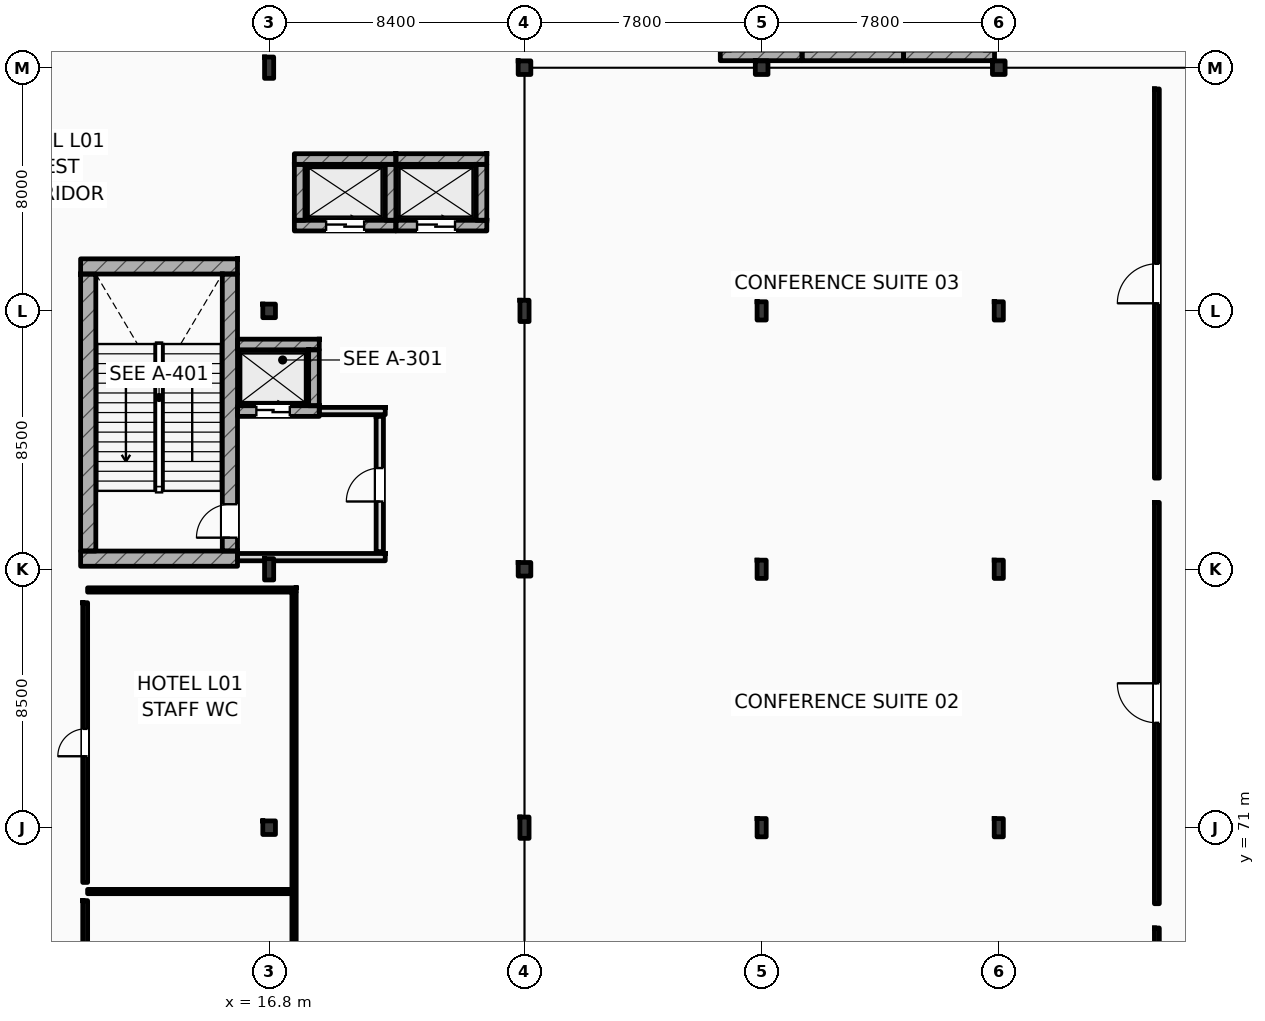
"""IFC4 building model, lengths in metres.
Left out: names, types, materials, properties, quantities, classifications, styles, units other than length and angle.
Written with IfcOpenShell. Run it as: python <this file> out.ifc"""

import sys

from ifc_helpers import new_model, si_unit, direction, frame, frame_2d, origin, origin_2d, place, context, subcontext, project, spatial, rectangle, i_section, extrude, element, fill, save


model = new_model("IFC4")
c1 = context("Model", 3, precision=1e-05, world=origin(), true_north=direction((0.0, 1.0)))
c2 = subcontext(c1, "Body", "Model", "MODEL_VIEW")
j1 = project(units=[si_unit("LENGTHUNIT", "METRE"), si_unit("PLANEANGLEUNIT", "RADIAN")], contexts=[c1])
p1 = place(None, origin())
s1 = spatial("IfcSite", under=j1, at=p1, CompositionType="ELEMENT")
p2 = place(p1, origin())
s2 = spatial("IfcBuilding", under=s1, at=p2, CompositionType="ELEMENT")
p3 = place(p2, frame((0.0, 0.0, 6.0)))
s3 = spatial("IfcBuildingStorey", under=s2, at=p3, CompositionType="ELEMENT", Elevation=6.0)
p4 = place(p3, frame((16.8, 71.0, 0.0), z_axis=(0.0, 0.0, 1.0), x_axis=(1.0, 0.0, 0.0)))
e1 = element("IfcColumn", 1, at=p4, inside=s3, PredefinedType="COLUMN", context=c2, shape_type="SweptSolid", body=[
    extrude(i_section(OverallWidth=0.416, OverallDepth=0.446, WebThickness=0.036, FlangeThickness=0.048, FilletRadius=0.015, at=origin_2d()), origin(), (0.0, 0.0, 1.0), 5.4),
])
p5 = place(p3, frame((16.8, 79.5, 0.0), z_axis=(0.0, 0.0, 1.0), x_axis=(1.0, 0.0, 0.0)))
e2 = element("IfcColumn", 2, at=p5, inside=s3, PredefinedType="COLUMN", context=c2, shape_type="SweptSolid", body=[
    extrude(i_section(OverallWidth=0.3, OverallDepth=0.7, WebThickness=0.017, FlangeThickness=0.032, FilletRadius=0.027, at=origin_2d()), origin(), (0.0, 0.0, 1.0), 5.4),
])
p6 = place(p3, frame((16.8, 88.0, 0.0), z_axis=(0.0, 0.0, 1.0), x_axis=(1.0, 0.0, 0.0)))
e3 = element("IfcColumn", 3, at=p6, inside=s3, PredefinedType="COLUMN", context=c2, shape_type="SweptSolid", body=[
    extrude(i_section(OverallWidth=0.416, OverallDepth=0.446, WebThickness=0.036, FlangeThickness=0.048, FilletRadius=0.015, at=origin_2d()), origin(), (0.0, 0.0, 1.0), 5.4),
])
for number, where, z_axis, x_axis in (
    (4, (16.8, 96.0, 0.0), (0.0, 0.0, 1.0), (1.0, 0.0, 0.0)),
    (5, (25.2, 71.0, 0.0), (0.0, 0.0, 1.0), (1.0, 0.0, 0.0)),
):
    element("IfcColumn", number, at=place(p3, frame(where, z_axis=z_axis, x_axis=x_axis)), inside=s3, PredefinedType="COLUMN", context=c2, shape_type="SweptSolid", body=[
        extrude(i_section(OverallWidth=0.3, OverallDepth=0.7, WebThickness=0.017, FlangeThickness=0.032, FilletRadius=0.027, at=origin_2d()), origin(), (0.0, 0.0, 1.0), 5.4),
    ])
p7 = place(p3, frame((25.2, 79.5, 0.0), z_axis=(0.0, 0.0, 1.0), x_axis=(1.0, 0.0, 0.0)))
e6 = element("IfcColumn", 6, at=p7, inside=s3, PredefinedType="COLUMN", context=c2, shape_type="SweptSolid", body=[
    extrude(i_section(OverallWidth=0.416, OverallDepth=0.446, WebThickness=0.036, FlangeThickness=0.048, FilletRadius=0.015, at=origin_2d()), origin(), (0.0, 0.0, 1.0), 5.4),
])
p8 = place(p3, frame((25.2, 88.0, 0.0), z_axis=(0.0, 0.0, 1.0), x_axis=(1.0, 0.0, 0.0)))
e7 = element("IfcColumn", 7, at=p8, inside=s3, PredefinedType="COLUMN", context=c2, shape_type="SweptSolid", body=[
    extrude(i_section(OverallWidth=0.3, OverallDepth=0.7, WebThickness=0.017, FlangeThickness=0.032, FilletRadius=0.027, at=origin_2d()), origin(), (0.0, 0.0, 1.0), 5.4),
])
for number, where, z_axis, x_axis in (
    (8, (25.2, 96.0, 0.0), (0.0, 0.0, 1.0), (1.0, 0.0, 0.0)),
    (9, (33.0, 96.0, 0.0), (0.0, 0.0, 1.0), (1.0, 0.0, 0.0)),
    (10, (40.8, 96.0, 0.0), (0.0, 0.0, 1.0), (1.0, 0.0, 0.0)),
):
    element("IfcColumn", number, at=place(p3, frame(where, z_axis=z_axis, x_axis=x_axis)), inside=s3, PredefinedType="COLUMN", context=c2, shape_type="SweptSolid", body=[
        extrude(i_section(OverallWidth=0.416, OverallDepth=0.446, WebThickness=0.036, FlangeThickness=0.048, FilletRadius=0.015, at=origin_2d()), origin(), (0.0, 0.0, 1.0), 5.4),
    ])
for number, where, z_axis, x_axis in (
    (11, (33.0, 71.0, 0.0), (0.0, 0.0, 1.0), (1.0, 0.0, 0.0)),
    (12, (33.0, 79.5, 0.0), (0.0, 0.0, 1.0), (1.0, 0.0, 0.0)),
    (13, (33.0, 88.0, 0.0), (0.0, 0.0, 1.0), (1.0, 0.0, 0.0)),
    (14, (40.8, 71.0, 0.0), (0.0, 0.0, 1.0), (1.0, 0.0, 0.0)),
    (15, (40.8, 79.5, 0.0), (0.0, 0.0, 1.0), (1.0, 0.0, 0.0)),
    (16, (40.8, 88.0, 0.0), (0.0, 0.0, 1.0), (1.0, 0.0, 0.0)),
):
    element("IfcColumn", number, at=place(p3, frame(where, z_axis=z_axis, x_axis=x_axis)), inside=s3, PredefinedType="COLUMN", context=c2, shape_type="SweptSolid", body=[
        extrude(i_section(OverallWidth=0.3, OverallDepth=0.6, WebThickness=0.015, FlangeThickness=0.03, FilletRadius=0.027, at=origin_2d()), origin(), (0.0, 0.0, 1.0), 5.4),
    ])
for number, where, z_axis, x_axis in (
    (17, (10.6, 89.462, 0.0), (0.0, 0.0, 1.0), (1.0, 0.0, 0.0)),
    (18, (10.6, 79.85, 0.0), (0.0, 0.0, 1.0), (1.0, 0.0, 0.0)),
):
    element("IfcWall", number, at=place(p3, frame(where, z_axis=z_axis, x_axis=x_axis)), inside=s3, PredefinedType="SHEAR", context=c2, shape_type="SweptSolid", body=[
        extrude(rectangle(XDim=5.16, YDim=0.5, at=frame_2d((2.58, 0.0))), origin(), (0.0, 0.0, 1.0), 5.4),
    ])
p9 = place(p3, frame((10.85, 80.1, 0.0), z_axis=(0.0, 0.0, 1.0), x_axis=(0.0, 1.0, 0.0)))
e19 = element("IfcWall", 19, at=p9, inside=s3, PredefinedType="SHEAR", context=c2, shape_type="SweptSolid", body=[
    extrude(rectangle(XDim=9.112, YDim=0.5, at=frame_2d((4.556, 0.0))), origin(), (0.0, 0.0, 1.0), 5.4),
])
p10 = place(p3, frame((15.51, 80.1, 0.0), z_axis=(0.0, 0.0, 1.0), x_axis=(0.0, 1.0, 0.0)))
e20 = element("IfcWall", 20, at=p10, inside=s3, PredefinedType="SHEAR", context=c2, shape_type="SweptSolid", body=[
    extrude(rectangle(XDim=9.112, YDim=0.5, at=frame_2d((4.556, 0.0))), origin(), (0.0, 0.0, 1.0), 5.4),
])
p11 = place(p10, frame((0.44, 0.0, 0.0)))
e21 = element("IfcOpeningElement", 21, at=p11, cuts=e20, PredefinedType="OPENING", context=c2, shape_type="SweptSolid", body=[
    extrude(rectangle(XDim=1.1, YDim=2.2, at=frame_2d((0.55, 1.1))), frame((0.0, 0.26, 0.0), z_axis=(0.0, -1.0, 0.0), x_axis=(1.0, 0.0, 0.0)), (0.0, 0.0, 1.0), 0.52),
])
p12 = place(p3, frame((15.76, 86.895, 0.0), z_axis=(0.0, 0.0, 1.0), x_axis=(1.0, 0.0, 0.0)))
e22 = element("IfcWall", 22, at=p12, inside=s3, PredefinedType="SHEAR", context=c2, shape_type="SweptSolid", body=[
    extrude(rectangle(XDim=2.69, YDim=0.35, at=frame_2d((1.345, 0.0))), origin(), (0.0, 0.0, 1.0), 5.05),
])
p13 = place(p3, frame((15.76, 84.705, 0.0), z_axis=(0.0, 0.0, 1.0), x_axis=(1.0, 0.0, 0.0)))
e23 = element("IfcWall", 23, at=p13, inside=s3, PredefinedType="SHEAR", context=c2, shape_type="SweptSolid", body=[
    extrude(rectangle(XDim=2.69, YDim=0.35, at=frame_2d((1.345, 0.0))), origin(), (0.0, 0.0, 1.0), 5.05),
])
p14 = place(p13, frame((0.62, 0.0, 0.0)))
e24 = element("IfcOpeningElement", 24, at=p14, cuts=e23, PredefinedType="OPENING", context=c2, shape_type="SweptSolid", body=[
    extrude(rectangle(XDim=1.1, YDim=2.2, at=frame_2d((0.55, 1.1))), frame((0.0, 0.185, 0.0), z_axis=(0.0, -1.0, 0.0), x_axis=(1.0, 0.0, 0.0)), (0.0, 0.0, 1.0), 0.37),
])
p15 = place(p3, frame((18.275, 84.88, 0.0), z_axis=(0.0, 0.0, 1.0), x_axis=(0.0, 1.0, 0.0)))
e25 = element("IfcWall", 25, at=p15, inside=s3, PredefinedType="SHEAR", context=c2, shape_type="SweptSolid", body=[
    extrude(rectangle(XDim=1.84, YDim=0.35, at=frame_2d((0.92, 0.0))), origin(), (0.0, 0.0, 1.0), 5.05),
])
p16 = place(p3, frame((31.64, 96.405, 0.0), z_axis=(0.0, 0.0, 1.0), x_axis=(1.0, 0.0, 0.0)))
e26 = element("IfcWall", 26, at=p16, inside=s3, PredefinedType="SHEAR", context=c2, shape_type="SweptSolid", body=[
    extrude(rectangle(XDim=2.69, YDim=0.35, at=frame_2d((1.345, 0.0))), origin(), (0.0, 0.0, 1.0), 5.05),
])
p17 = place(p3, frame((17.63, 92.995, 0.0), z_axis=(0.0, 0.0, 1.0), x_axis=(1.0, 0.0, 0.0)))
e27 = element("IfcWall", 27, at=p17, inside=s3, PredefinedType="SHEAR", context=c2, shape_type="SweptSolid", body=[
    extrude(rectangle(XDim=3.34, YDim=0.35, at=frame_2d((1.67, 0.0))), origin(), (0.0, 0.0, 1.0), 5.05),
])
p18 = place(p3, frame((17.63, 90.805, 0.0), z_axis=(0.0, 0.0, 1.0), x_axis=(1.0, 0.0, 0.0)))
e28 = element("IfcWall", 28, at=p18, inside=s3, PredefinedType="SHEAR", context=c2, shape_type="SweptSolid", body=[
    extrude(rectangle(XDim=3.34, YDim=0.35, at=frame_2d((1.67, 0.0))), origin(), (0.0, 0.0, 1.0), 5.05),
])
p19 = place(p18, frame((1.045, 0.0, 0.0)))
e29 = element("IfcOpeningElement", 29, at=p19, cuts=e28, PredefinedType="OPENING", context=c2, shape_type="SweptSolid", body=[
    extrude(rectangle(XDim=1.25, YDim=2.25, at=frame_2d((0.625, 1.125))), frame((0.0, 0.185, 0.0), z_axis=(0.0, -1.0, 0.0), x_axis=(1.0, 0.0, 0.0)), (0.0, 0.0, 1.0), 0.37),
])
for number, where, z_axis, x_axis in (
    (30, (17.805, 90.98, 0.0), (0.0, 0.0, 1.0), (0.0, 1.0, 0.0)),
    (31, (20.795, 90.98, 0.0), (0.0, 0.0, 1.0), (0.0, 1.0, 0.0)),
):
    element("IfcWall", number, at=place(p3, frame(where, z_axis=z_axis, x_axis=x_axis)), inside=s3, PredefinedType="SHEAR", context=c2, shape_type="SweptSolid", body=[
        extrude(rectangle(XDim=1.84, YDim=0.35, at=frame_2d((0.92, 0.0))), origin(), (0.0, 0.0, 1.0), 5.05),
    ])
p20 = place(p3, frame((20.97, 92.995, 0.0), z_axis=(0.0, 0.0, 1.0), x_axis=(1.0, 0.0, 0.0)))
e32 = element("IfcWall", 32, at=p20, inside=s3, PredefinedType="SHEAR", context=c2, shape_type="SweptSolid", body=[
    extrude(rectangle(XDim=2.99, YDim=0.35, at=frame_2d((1.495, 0.0))), origin(), (0.0, 0.0, 1.0), 5.05),
])
p21 = place(p3, frame((20.97, 90.805, 0.0), z_axis=(0.0, 0.0, 1.0), x_axis=(1.0, 0.0, 0.0)))
e33 = element("IfcWall", 33, at=p21, inside=s3, PredefinedType="SHEAR", context=c2, shape_type="SweptSolid", body=[
    extrude(rectangle(XDim=2.99, YDim=0.35, at=frame_2d((1.495, 0.0))), origin(), (0.0, 0.0, 1.0), 5.05),
])
p22 = place(p21, frame((0.695, 0.0, 0.0)))
e34 = element("IfcOpeningElement", 34, at=p22, cuts=e33, PredefinedType="OPENING", context=c2, shape_type="SweptSolid", body=[
    extrude(rectangle(XDim=1.25, YDim=2.25, at=frame_2d((0.625, 1.125))), frame((0.0, 0.185, 0.0), z_axis=(0.0, -1.0, 0.0), x_axis=(1.0, 0.0, 0.0)), (0.0, 0.0, 1.0), 0.37),
])
p23 = place(p3, frame((23.785, 90.98, 0.0), z_axis=(0.0, 0.0, 1.0), x_axis=(0.0, 1.0, 0.0)))
e35 = element("IfcWall", 35, at=p23, inside=s3, PredefinedType="SHEAR", context=c2, shape_type="SweptSolid", body=[
    extrude(rectangle(XDim=1.84, YDim=0.35, at=frame_2d((0.92, 0.0))), origin(), (0.0, 0.0, 1.0), 5.05),
])
p24 = place(p3, frame((34.33, 96.405, 0.0), z_axis=(0.0, 0.0, 1.0), x_axis=(1.0, 0.0, 0.0)))
e36 = element("IfcWall", 36, at=p24, inside=s3, PredefinedType="SHEAR", context=c2, shape_type="SweptSolid", body=[
    extrude(rectangle(XDim=3.34, YDim=0.35, at=frame_2d((1.67, 0.0))), origin(), (0.0, 0.0, 1.0), 5.05),
])
p25 = place(p3, frame((37.67, 96.405, 0.0), z_axis=(0.0, 0.0, 1.0), x_axis=(1.0, 0.0, 0.0)))
e37 = element("IfcWall", 37, at=p25, inside=s3, PredefinedType="SHEAR", context=c2, shape_type="SweptSolid", body=[
    extrude(rectangle(XDim=2.99, YDim=0.35, at=frame_2d((1.495, 0.0))), origin(), (0.0, 0.0, 1.0), 5.05),
])
p26 = place(p3, frame((15.76, 79.9, 0.0), z_axis=(0.0, 0.0, 1.0), x_axis=(1.0, 0.0, 0.0)))
e38 = element("IfcWall", 38, at=p26, inside=s3, PredefinedType="STANDARD", context=c2, shape_type="SweptSolid", body=[
    extrude(rectangle(XDim=4.86, YDim=0.24, at=frame_2d((2.43, 0.0))), origin(), (0.0, 0.0, 1.0), 2.84),
])
p27 = place(p3, frame((18.45, 84.705, 0.0), z_axis=(0.0, 0.0, 1.0), x_axis=(1.0, 0.0, 0.0)))
e39 = element("IfcWall", 39, at=p27, inside=s3, PredefinedType="STANDARD", context=c2, shape_type="SweptSolid", body=[
    extrude(rectangle(XDim=2.17, YDim=0.24, at=frame_2d((1.085, 0.0))), origin(), (0.0, 0.0, 1.0), 5.05),
])
p28 = place(p3, frame((20.44, 80.08, 0.0), z_axis=(0.0, 0.0, 1.0), x_axis=(0.0, 1.0, 0.0)))
e40 = element("IfcWall", 40, at=p28, inside=s3, PredefinedType="STANDARD", context=c2, shape_type="SweptSolid", body=[
    extrude(rectangle(XDim=4.45, YDim=0.24, at=frame_2d((2.225, 0.0))), origin(), (0.0, 0.0, 1.0), 5.05),
])
p29 = place(p28, frame((1.65, 0.0, 0.0)))
e41 = element("IfcOpeningElement", 41, at=p29, cuts=e40, PredefinedType="OPENING", context=c2, shape_type="SweptSolid", body=[
    extrude(rectangle(XDim=1.1, YDim=2.2, at=frame_2d((0.55, 1.1))), frame((0.0, 0.13, 0.0), z_axis=(0.0, -1.0, 0.0), x_axis=(1.0, 0.0, 0.0)), (0.0, 0.0, 1.0), 0.26),
])
p30 = place(p3, frame((46.0, 54.7, 0.0), z_axis=(0.0, 0.0, 1.0), x_axis=(0.0, 1.0, 0.0)))
e42 = element("IfcWall", 42, at=p30, inside=s3, PredefinedType="PARTITIONING", context=c2, shape_type="SweptSolid", body=[
    extrude(rectangle(XDim=13.0, YDim=0.16, at=frame_2d((6.5, 0.0))), origin(), (0.0, 0.0, 1.0), 4.71),
])
p31 = place(p30, frame((5.85, 0.0, 0.0)))
e43 = element("IfcOpeningElement", 43, at=p31, cuts=e42, PredefinedType="OPENING", context=c2, shape_type="SweptSolid", body=[
    extrude(rectangle(XDim=1.3, YDim=2.2, at=frame_2d((0.65, 1.1))), frame((0.0, 0.09, 0.0), z_axis=(0.0, -1.0, 0.0), x_axis=(1.0, 0.0, 0.0)), (0.0, 0.0, 1.0), 0.18),
])
p32 = place(p3, frame((46.0, 68.5, 0.0), z_axis=(0.0, 0.0, 1.0), x_axis=(0.0, 1.0, 0.0)))
e44 = element("IfcWall", 44, at=p32, inside=s3, PredefinedType="PARTITIONING", context=c2, shape_type="SweptSolid", body=[
    extrude(rectangle(XDim=13.2, YDim=0.16, at=frame_2d((6.6, 0.0))), origin(), (0.0, 0.0, 1.0), 4.71),
])
p33 = place(p32, frame((5.95, 0.0, 0.0)))
e45 = element("IfcOpeningElement", 45, at=p33, cuts=e44, PredefinedType="OPENING", context=c2, shape_type="SweptSolid", body=[
    extrude(rectangle(XDim=1.3, YDim=2.2, at=frame_2d((0.65, 1.1))), frame((0.0, 0.09, 0.0), z_axis=(0.0, -1.0, 0.0), x_axis=(1.0, 0.0, 0.0)), (0.0, 0.0, 1.0), 0.18),
])
p34 = place(p3, frame((46.0, 82.5, 0.0), z_axis=(0.0, 0.0, 1.0), x_axis=(0.0, 1.0, 0.0)))
e46 = element("IfcWall", 46, at=p34, inside=s3, PredefinedType="PARTITIONING", context=c2, shape_type="SweptSolid", body=[
    extrude(rectangle(XDim=12.8, YDim=0.16, at=frame_2d((6.4, 0.0))), origin(), (0.0, 0.0, 1.0), 4.71),
])
p35 = place(p34, frame((5.75, 0.0, 0.0)))
e47 = element("IfcOpeningElement", 47, at=p35, cuts=e46, PredefinedType="OPENING", context=c2, shape_type="SweptSolid", body=[
    extrude(rectangle(XDim=1.3, YDim=2.2, at=frame_2d((0.65, 1.1))), frame((0.0, 0.09, 0.0), z_axis=(0.0, -1.0, 0.0), x_axis=(1.0, 0.0, 0.0)), (0.0, 0.0, 1.0), 0.18),
])
p36 = place(p3, frame((10.75, 63.2, 0.0), z_axis=(0.0, 0.0, 1.0), x_axis=(0.0, 1.0, 0.0)))
e48 = element("IfcWall", 48, at=p36, inside=s3, PredefinedType="PARTITIONING", context=c2, shape_type="SweptSolid", body=[
    extrude(rectangle(XDim=5.4, YDim=0.16, at=frame_2d((2.7, 0.0))), origin(), (0.0, 0.0, 1.0), 5.05),
])
p37 = place(p36, frame((2.23, 0.0, 0.0)))
e49 = element("IfcOpeningElement", 49, at=p37, cuts=e48, PredefinedType="OPENING", context=c2, shape_type="SweptSolid", body=[
    extrude(rectangle(XDim=0.94, YDim=2.15, at=frame_2d((0.47, 1.075))), frame((0.0, 0.09, 0.0), z_axis=(0.0, -1.0, 0.0), x_axis=(1.0, 0.0, 0.0)), (0.0, 0.0, 1.0), 0.18),
])
p38 = place(p3, frame((10.75, 69.2, 0.0), z_axis=(0.0, 0.0, 1.0), x_axis=(0.0, 1.0, 0.0)))
e50 = element("IfcWall", 50, at=p38, inside=s3, PredefinedType="PARTITIONING", context=c2, shape_type="SweptSolid", body=[
    extrude(rectangle(XDim=9.2, YDim=0.16, at=frame_2d((4.6, 0.0))), origin(), (0.0, 0.0, 1.0), 5.05),
])
p39 = place(p38, frame((4.15, 0.0, 0.0)))
e51 = element("IfcOpeningElement", 51, at=p39, cuts=e50, PredefinedType="OPENING", context=c2, shape_type="SweptSolid", body=[
    extrude(rectangle(XDim=0.9, YDim=2.1, at=frame_2d((0.45, 1.05))), frame((0.0, 0.09, 0.0), z_axis=(0.0, -1.0, 0.0), x_axis=(1.0, 0.0, 0.0)), (0.0, 0.0, 1.0), 0.18),
])
p40 = place(p3, frame((10.83, 68.9, 0.0), z_axis=(0.0, 0.0, 1.0), x_axis=(1.0, 0.0, 0.0)))
e52 = element("IfcWall", 52, at=p40, inside=s3, PredefinedType="PARTITIONING", context=c2, shape_type="SweptSolid", body=[
    extrude(rectangle(XDim=6.72, YDim=0.14, at=frame_2d((3.36, 0.0))), origin(), (0.0, 0.0, 1.0), 5.05),
])
p41 = place(p3, frame((17.62, 62.7, 0.0), z_axis=(0.0, 0.0, 1.0), x_axis=(0.0, 1.0, 0.0)))
e53 = element("IfcWall", 53, at=p41, inside=s3, PredefinedType="PARTITIONING", context=c2, shape_type="SweptSolid", body=[
    extrude(rectangle(XDim=16.05, YDim=0.14, at=frame_2d((8.025, 0.0))), origin(), (0.0, 0.0, 1.0), 5.05),
])
p42 = place(p3, frame((10.83, 78.82, 0.0), z_axis=(0.0, 0.0, 1.0), x_axis=(1.0, 0.0, 0.0)))
e54 = element("IfcWall", 54, at=p42, inside=s3, PredefinedType="PARTITIONING", context=c2, shape_type="SweptSolid", body=[
    extrude(rectangle(XDim=6.86, YDim=0.14, at=frame_2d((3.43, 0.0))), origin(), (0.0, 0.0, 1.0), 5.05),
])
p43 = place(p11, origin())
e55 = element("IfcDoor", 55, at=p43, inside=s3, OperationType="SINGLE_SWING_LEFT", PredefinedType="DOOR", context=c2, shape_type="SweptSolid", body=[
    extrude(rectangle(XDim=1.1, YDim=2.2, at=frame_2d((0.55, 1.1))), frame((0.0, 0.025, 0.0), z_axis=(0.0, -1.0, 0.0), x_axis=(1.0, 0.0, 0.0)), (0.0, 0.0, 1.0), 0.05),
])
fill(e21, e55)
p44 = place(p14, origin())
e56 = element("IfcDoor", 56, at=p44, inside=s3, OperationType="SLIDING_TO_LEFT", PredefinedType="DOOR", context=c2, shape_type="SweptSolid", body=[
    extrude(rectangle(XDim=1.1, YDim=2.2, at=frame_2d((0.55, 1.1))), frame((0.0, 0.025, 0.0), z_axis=(0.0, -1.0, 0.0), x_axis=(1.0, 0.0, 0.0)), (0.0, 0.0, 1.0), 0.05),
])
fill(e24, e56)
p45 = place(p19, origin())
e57 = element("IfcDoor", 57, at=p45, inside=s3, OperationType="SLIDING_TO_LEFT", PredefinedType="DOOR", context=c2, shape_type="SweptSolid", body=[
    extrude(rectangle(XDim=1.25, YDim=2.25, at=frame_2d((0.625, 1.125))), frame((0.0, 0.025, 0.0), z_axis=(0.0, -1.0, 0.0), x_axis=(1.0, 0.0, 0.0)), (0.0, 0.0, 1.0), 0.05),
])
fill(e29, e57)
p46 = place(p22, origin())
e58 = element("IfcDoor", 58, at=p46, inside=s3, OperationType="SLIDING_TO_LEFT", PredefinedType="DOOR", context=c2, shape_type="SweptSolid", body=[
    extrude(rectangle(XDim=1.25, YDim=2.25, at=frame_2d((0.625, 1.125))), frame((0.0, 0.025, 0.0), z_axis=(0.0, -1.0, 0.0), x_axis=(1.0, 0.0, 0.0)), (0.0, 0.0, 1.0), 0.05),
])
fill(e34, e58)
p47 = place(p29, origin())
e59 = element("IfcDoor", 59, at=p47, inside=s3, OperationType="SINGLE_SWING_LEFT", PredefinedType="DOOR", context=c2, shape_type="SweptSolid", body=[
    extrude(rectangle(XDim=1.1, YDim=2.2, at=frame_2d((0.55, 1.1))), frame((0.0, 0.025, 0.0), z_axis=(0.0, -1.0, 0.0), x_axis=(1.0, 0.0, 0.0)), (0.0, 0.0, 1.0), 0.05),
])
fill(e41, e59)
p48 = place(p33, origin())
e60 = element("IfcDoor", 60, at=p48, inside=s3, OperationType="SINGLE_SWING_RIGHT", PredefinedType="DOOR", context=c2, shape_type="SweptSolid", body=[
    extrude(rectangle(XDim=1.3, YDim=2.2, at=frame_2d((0.65, 1.1))), frame((0.0, 0.025, 0.0), z_axis=(0.0, -1.0, 0.0), x_axis=(1.0, 0.0, 0.0)), (0.0, 0.0, 1.0), 0.05),
])
fill(e45, e60)
p49 = place(p35, origin())
e61 = element("IfcDoor", 61, at=p49, inside=s3, OperationType="SINGLE_SWING_LEFT", PredefinedType="DOOR", context=c2, shape_type="SweptSolid", body=[
    extrude(rectangle(XDim=1.3, YDim=2.2, at=frame_2d((0.65, 1.1))), frame((0.0, 0.025, 0.0), z_axis=(0.0, -1.0, 0.0), x_axis=(1.0, 0.0, 0.0)), (0.0, 0.0, 1.0), 0.05),
])
fill(e47, e61)
p50 = place(p39, origin())
e62 = element("IfcDoor", 62, at=p50, inside=s3, OperationType="SINGLE_SWING_LEFT", PredefinedType="DOOR", context=c2, shape_type="SweptSolid", body=[
    extrude(rectangle(XDim=0.9, YDim=2.1, at=frame_2d((0.45, 1.05))), frame((0.0, 0.025, 0.0), z_axis=(0.0, -1.0, 0.0), x_axis=(1.0, 0.0, 0.0)), (0.0, 0.0, 1.0), 0.05),
])
fill(e51, e62)
save(model, sys.argv[1])
